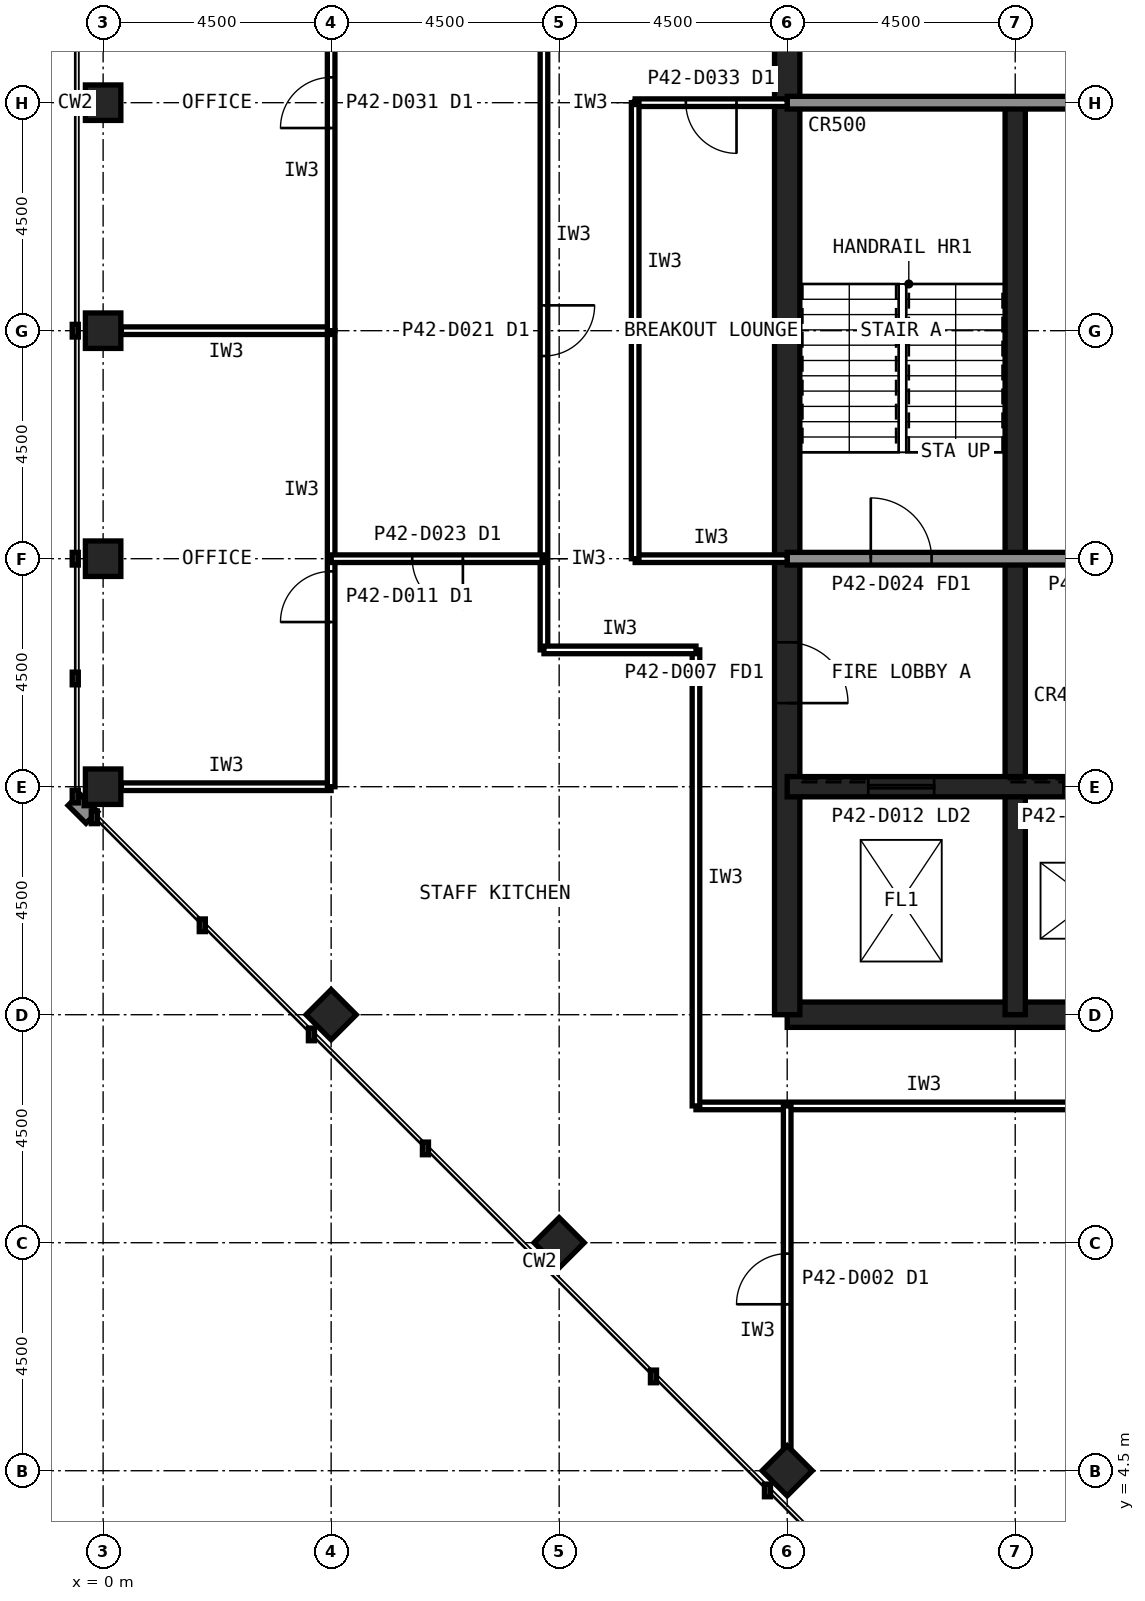
"""IFC4 building model, lengths in metres.
Left out: names, types, materials, properties, quantities, classifications, styles, units other than length and angle.
Written with IfcOpenShell. Run it as: python <this file> out.ifc"""

import sys

from ifc_helpers import new_model, si_unit, direction, frame, frame_2d, origin, origin_2d, place, context, subcontext, project, spatial, rectangle, hollow_rectangle, extrude, element, fill, save


model = new_model("IFC4")
c1 = context("Model", 3, precision=1e-05, world=origin(), true_north=direction((0.0, 1.0)))
c2 = subcontext(c1, "Body", "Model", "MODEL_VIEW")
j1 = project(units=[si_unit("LENGTHUNIT", "METRE"), si_unit("PLANEANGLEUNIT", "RADIAN")], contexts=[c1])
p1 = place(None, origin())
s1 = spatial("IfcSite", under=j1, at=p1, CompositionType="ELEMENT")
p2 = place(p1, origin())
s2 = spatial("IfcBuilding", under=s1, at=p2, CompositionType="ELEMENT")
p3 = place(p2, frame((0.0, 0.0, 175.6)))
s3 = spatial("IfcBuildingStorey", under=s2, at=p3, CompositionType="ELEMENT", Elevation=175.6)
for number, where, z_axis, x_axis in (
    (1, (0.0, 31.5, 0.0), (0.0, 0.0, 1.0), (1.0, 0.0, 0.0)),
    (2, (0.0, 27.0, 0.0), (0.0, 0.0, 1.0), (1.0, 0.0, 0.0)),
    (3, (0.0, 22.5, 0.0), (0.0, 0.0, 1.0), (1.0, 0.0, 0.0)),
    (4, (0.0, 18.0, 0.0), (0.0, 0.0, 1.0), (1.0, 0.0, 0.0)),
    (5, (13.5, 4.5, 0.0), (0.0, 0.0, 1.0), (0.707, 0.707, 0.0)),
    (6, (9.0, 9.0, 0.0), (0.0, 0.0, 1.0), (0.707, 0.707, 0.0)),
    (7, (4.5, 13.5, 0.0), (0.0, 0.0, 1.0), (0.707, 0.707, 0.0)),
):
    element("IfcColumn", number, at=place(p3, frame(where, z_axis=z_axis, x_axis=x_axis)), inside=s3, PredefinedType="COLUMN", context=c2, shape_type="SweptSolid", body=[
        extrude(hollow_rectangle(XDim=0.7, YDim=0.7, WallThickness=0.036, at=origin_2d()), origin(), (0.0, 0.0, 1.0), 4.0),
    ])
p4 = place(p3, frame((13.5, 13.5, 0.0), z_axis=(0.0, 0.0, 1.0), x_axis=(1.0, 0.0, 0.0)))
e8 = element("IfcWall", 8, at=p4, inside=s3, PredefinedType="SHEAR", context=c2, shape_type="SweptSolid", body=[
    extrude(rectangle(XDim=27.0, YDim=0.5, at=frame_2d((13.5, 0.0))), origin(), (0.0, 0.0, 1.0), 4.0),
])
p5 = place(p3, frame((13.5, 40.5, 0.0), z_axis=(0.0, 0.0, 1.0), x_axis=(0.0, -1.0, 0.0)))
e9 = element("IfcWall", 9, at=p5, inside=s3, PredefinedType="SHEAR", context=c2, shape_type="SweptSolid", body=[
    extrude(rectangle(XDim=27.0, YDim=0.5, at=frame_2d((13.5, 0.0))), origin(), (0.0, 0.0, 1.0), 4.0),
])
p6 = place(p5, frame((19.65, 0.0, 0.0)))
e10 = element("IfcOpeningElement", 10, at=p6, cuts=e9, PredefinedType="OPENING", context=c2, shape_type="SweptSolid", body=[
    extrude(rectangle(XDim=1.2, YDim=2.1, at=frame_2d((0.6, 1.05))), frame((0.0, 0.26, 0.0), z_axis=(0.0, -1.0, 0.0), x_axis=(1.0, 0.0, 0.0)), (0.0, 0.0, 1.0), 0.52),
])
p7 = place(p5, frame((5.85, 0.0, 0.0)))
e11 = element("IfcOpeningElement", 11, at=p7, cuts=e9, PredefinedType="OPENING", context=c2, shape_type="SweptSolid", body=[
    extrude(rectangle(XDim=1.8, YDim=2.1, at=frame_2d((0.9, 1.05))), frame((0.0, 0.26, 0.0), z_axis=(0.0, -1.0, 0.0), x_axis=(1.0, 0.0, 0.0)), (0.0, 0.0, 1.0), 0.52),
])
p8 = place(p3, frame((18.0, 13.5, 0.0), z_axis=(0.0, 0.0, 1.0), x_axis=(0.0, 1.0, 0.0)))
e12 = element("IfcWall", 12, at=p8, inside=s3, PredefinedType="SHEAR", context=c2, shape_type="SweptSolid", body=[
    extrude(rectangle(XDim=18.0, YDim=0.4, at=frame_2d((9.0, 0.0))), origin(), (0.0, 0.0, 1.0), 4.0),
])
p9 = place(p3, frame((13.5, 18.0, 0.0), z_axis=(0.0, 0.0, 1.0), x_axis=(1.0, 0.0, 0.0)))
e13 = element("IfcWall", 13, at=p9, inside=s3, PredefinedType="SHEAR", context=c2, shape_type="SweptSolid", body=[
    extrude(rectangle(XDim=27.0, YDim=0.4, at=frame_2d((13.5, 0.0))), origin(), (0.0, 0.0, 1.0), 4.0),
])
p10 = place(p9, frame((24.3, 0.0, 0.0)))
e14 = element("IfcOpeningElement", 14, at=p10, cuts=e13, PredefinedType="OPENING", context=c2, shape_type="SweptSolid", body=[
    extrude(rectangle(XDim=0.9, YDim=2.1, at=frame_2d((0.45, 1.05))), frame((0.0, 0.21, 0.0), z_axis=(0.0, -1.0, 0.0), x_axis=(1.0, 0.0, 0.0)), (0.0, 0.0, 1.0), 0.42),
])
p11 = place(p9, frame((5.45, 0.0, 0.0)))
e15 = element("IfcOpeningElement", 15, at=p11, cuts=e13, PredefinedType="OPENING", context=c2, shape_type="SweptSolid", body=[
    extrude(rectangle(XDim=1.1, YDim=2.1, at=frame_2d((0.55, 1.05))), frame((0.0, 0.21, 0.0), z_axis=(0.0, -1.0, 0.0), x_axis=(1.0, 0.0, 0.0)), (0.0, 0.0, 1.0), 0.42),
])
p12 = place(p9, frame((8.45, 0.0, 0.0)))
e16 = element("IfcOpeningElement", 16, at=p12, cuts=e13, PredefinedType="OPENING", context=c2, shape_type="SweptSolid", body=[
    extrude(rectangle(XDim=1.1, YDim=2.1, at=frame_2d((0.55, 1.05))), frame((0.0, 0.21, 0.0), z_axis=(0.0, -1.0, 0.0), x_axis=(1.0, 0.0, 0.0)), (0.0, 0.0, 1.0), 0.42),
])
p13 = place(p9, frame((11.45, 0.0, 0.0)))
e17 = element("IfcOpeningElement", 17, at=p13, cuts=e13, PredefinedType="OPENING", context=c2, shape_type="SweptSolid", body=[
    extrude(rectangle(XDim=1.1, YDim=2.1, at=frame_2d((0.55, 1.05))), frame((0.0, 0.21, 0.0), z_axis=(0.0, -1.0, 0.0), x_axis=(1.0, 0.0, 0.0)), (0.0, 0.0, 1.0), 0.42),
])
p14 = place(p9, frame((14.45, 0.0, 0.0)))
e18 = element("IfcOpeningElement", 18, at=p14, cuts=e13, PredefinedType="OPENING", context=c2, shape_type="SweptSolid", body=[
    extrude(rectangle(XDim=1.1, YDim=2.1, at=frame_2d((0.55, 1.05))), frame((0.0, 0.21, 0.0), z_axis=(0.0, -1.0, 0.0), x_axis=(1.0, 0.0, 0.0)), (0.0, 0.0, 1.0), 0.42),
])
p15 = place(p9, frame((17.45, 0.0, 0.0)))
e19 = element("IfcOpeningElement", 19, at=p15, cuts=e13, PredefinedType="OPENING", context=c2, shape_type="SweptSolid", body=[
    extrude(rectangle(XDim=1.1, YDim=2.1, at=frame_2d((0.55, 1.05))), frame((0.0, 0.21, 0.0), z_axis=(0.0, -1.0, 0.0), x_axis=(1.0, 0.0, 0.0)), (0.0, 0.0, 1.0), 0.42),
])
p16 = place(p9, frame((20.45, 0.0, 0.0)))
e20 = element("IfcOpeningElement", 20, at=p16, cuts=e13, PredefinedType="OPENING", context=c2, shape_type="SweptSolid", body=[
    extrude(rectangle(XDim=1.1, YDim=2.1, at=frame_2d((0.55, 1.05))), frame((0.0, 0.21, 0.0), z_axis=(0.0, -1.0, 0.0), x_axis=(1.0, 0.0, 0.0)), (0.0, 0.0, 1.0), 0.42),
])
p17 = place(p9, frame((1.6, 0.0, 0.0)))
e21 = element("IfcOpeningElement", 21, at=p17, cuts=e13, PredefinedType="OPENING", context=c2, shape_type="SweptSolid", body=[
    extrude(rectangle(XDim=1.3, YDim=2.2, at=frame_2d((0.65, 1.1))), frame((0.0, 0.21, 0.0), z_axis=(0.0, -1.0, 0.0), x_axis=(1.0, 0.0, 0.0)), (0.0, 0.0, 1.0), 0.42),
])
p18 = place(p3, frame((13.5, 22.5, 0.0), z_axis=(0.0, 0.0, 1.0), x_axis=(1.0, 0.0, 0.0)))
e22 = element("IfcWall", 22, at=p18, inside=s3, PredefinedType="SOLIDWALL", context=c2, shape_type="SweptSolid", body=[
    extrude(rectangle(XDim=27.0, YDim=0.25, at=frame_2d((13.5, 0.0))), origin(), (0.0, 0.0, 1.0), 3.84),
])
p19 = place(p18, frame((1.65, 0.0, 0.0)))
e23 = element("IfcOpeningElement", 23, at=p19, cuts=e22, PredefinedType="OPENING", context=c2, shape_type="SweptSolid", body=[
    extrude(rectangle(XDim=1.2, YDim=2.1, at=frame_2d((0.6, 1.05))), frame((0.0, 0.135, 0.0), z_axis=(0.0, -1.0, 0.0), x_axis=(1.0, 0.0, 0.0)), (0.0, 0.0, 1.0), 0.27),
])
p20 = place(p18, frame((6.025, 0.0, 0.0)))
e24 = element("IfcOpeningElement", 24, at=p20, cuts=e22, PredefinedType="OPENING", context=c2, shape_type="SweptSolid", body=[
    extrude(rectangle(XDim=1.0, YDim=2.1, at=frame_2d((0.5, 1.05))), frame((0.0, 0.135, 0.0), z_axis=(0.0, -1.0, 0.0), x_axis=(1.0, 0.0, 0.0)), (0.0, 0.0, 1.0), 0.27),
])
p21 = place(p18, frame((10.525, 0.0, 0.0)))
e25 = element("IfcOpeningElement", 25, at=p21, cuts=e22, PredefinedType="OPENING", context=c2, shape_type="SweptSolid", body=[
    extrude(rectangle(XDim=1.0, YDim=2.1, at=frame_2d((0.5, 1.05))), frame((0.0, 0.135, 0.0), z_axis=(0.0, -1.0, 0.0), x_axis=(1.0, 0.0, 0.0)), (0.0, 0.0, 1.0), 0.27),
])
p22 = place(p18, frame((19.75, 0.0, 0.0)))
e26 = element("IfcOpeningElement", 26, at=p22, cuts=e22, PredefinedType="OPENING", context=c2, shape_type="SweptSolid", body=[
    extrude(rectangle(XDim=1.0, YDim=2.1, at=frame_2d((0.5, 1.05))), frame((0.0, 0.135, 0.0), z_axis=(0.0, -1.0, 0.0), x_axis=(1.0, 0.0, 0.0)), (0.0, 0.0, 1.0), 0.27),
])
p23 = place(p18, frame((15.05, 0.0, 0.0)))
e27 = element("IfcOpeningElement", 27, at=p23, cuts=e22, PredefinedType="OPENING", context=c2, shape_type="SweptSolid", body=[
    extrude(rectangle(XDim=1.4, YDim=2.4, at=frame_2d((0.7, 1.2))), frame((0.0, 0.135, 0.0), z_axis=(0.0, -1.0, 0.0), x_axis=(1.0, 0.0, 0.0)), (0.0, 0.0, 1.0), 0.27),
])
p24 = place(p3, frame((13.5, 31.5, 0.0), z_axis=(0.0, 0.0, 1.0), x_axis=(1.0, 0.0, 0.0)))
e28 = element("IfcWall", 28, at=p24, inside=s3, PredefinedType="SOLIDWALL", context=c2, shape_type="SweptSolid", body=[
    extrude(rectangle(XDim=27.0, YDim=0.25, at=frame_2d((13.5, 0.0))), origin(), (0.0, 0.0, 1.0), 3.84),
])
p25 = place(p24, frame((24.15, 0.0, 0.0)))
e29 = element("IfcOpeningElement", 29, at=p25, cuts=e28, PredefinedType="OPENING", context=c2, shape_type="SweptSolid", body=[
    extrude(rectangle(XDim=1.2, YDim=2.1, at=frame_2d((0.6, 1.05))), frame((0.0, 0.135, 0.0), z_axis=(0.0, -1.0, 0.0), x_axis=(1.0, 0.0, 0.0)), (0.0, 0.0, 1.0), 0.27),
])
p26 = place(p24, frame((15.3, 0.0, 0.0)))
e30 = element("IfcOpeningElement", 30, at=p26, cuts=e28, PredefinedType="OPENING", context=c2, shape_type="SweptSolid", body=[
    extrude(rectangle(XDim=0.9, YDim=2.1, at=frame_2d((0.45, 1.05))), frame((0.0, 0.135, 0.0), z_axis=(0.0, -1.0, 0.0), x_axis=(1.0, 0.0, 0.0)), (0.0, 0.0, 1.0), 0.27),
])
p27 = place(p24, frame((19.8, 0.0, 0.0)))
e31 = element("IfcOpeningElement", 31, at=p27, cuts=e28, PredefinedType="OPENING", context=c2, shape_type="SweptSolid", body=[
    extrude(rectangle(XDim=0.9, YDim=2.1, at=frame_2d((0.45, 1.05))), frame((0.0, 0.135, 0.0), z_axis=(0.0, -1.0, 0.0), x_axis=(1.0, 0.0, 0.0)), (0.0, 0.0, 1.0), 0.27),
])
p28 = place(p3, frame((8.7, 33.3, 0.0), z_axis=(0.0, 0.0, 1.0), x_axis=(0.0, -1.0, 0.0)))
e32 = element("IfcWall", 32, at=p28, inside=s3, PredefinedType="PARTITIONING", context=c2, shape_type="SweptSolid", body=[
    extrude(rectangle(XDim=12.6, YDim=0.15, at=frame_2d((6.3, 0.0))), origin(), (0.0, 0.0, 1.0), 3.84),
])
p29 = place(p28, frame((5.8, 0.0, 0.0)))
e33 = element("IfcOpeningElement", 33, at=p29, cuts=e32, PredefinedType="OPENING", context=c2, shape_type="SweptSolid", body=[
    extrude(rectangle(XDim=1.0, YDim=2.1, at=frame_2d((0.5, 1.05))), frame((0.0, 0.085, 0.0), z_axis=(0.0, -1.0, 0.0), x_axis=(1.0, 0.0, 0.0)), (0.0, 0.0, 1.0), 0.17),
])
for number, where, z_axis, x_axis in (
    (34, (11.7, 11.7, 0.0), (0.0, 0.0, 1.0), (1.0, 0.0, 0.0)),
    (35, (11.7, 20.7, 0.0), (0.0, 0.0, 1.0), (0.0, -1.0, 0.0)),
):
    element("IfcWall", number, at=place(p3, frame(where, z_axis=z_axis, x_axis=x_axis)), inside=s3, PredefinedType="PARTITIONING", context=c2, shape_type="SweptSolid", body=[
        extrude(rectangle(XDim=9.0, YDim=0.15, at=frame_2d((4.5, 0.0))), origin(), (0.0, 0.0, 1.0), 3.84),
    ])
p30 = place(p3, frame((8.7, 20.7, 0.0), z_axis=(0.0, 0.0, 1.0), x_axis=(1.0, 0.0, 0.0)))
e36 = element("IfcWall", 36, at=p30, inside=s3, PredefinedType="PARTITIONING", context=c2, shape_type="SweptSolid", body=[
    extrude(rectangle(XDim=3.0, YDim=0.15, at=frame_2d((1.5, 0.0))), origin(), (0.0, 0.0, 1.0), 3.84),
])
p31 = place(p3, frame((0.36, 18.0, 0.0), z_axis=(0.0, 0.0, 1.0), x_axis=(1.0, 0.0, 0.0)))
e37 = element("IfcWall", 37, at=p31, inside=s3, PredefinedType="PARTITIONING", context=c2, shape_type="SweptSolid", body=[
    extrude(rectangle(XDim=4.14, YDim=0.15, at=frame_2d((2.07, 0.0))), origin(), (0.0, 0.0, 1.0), 2.989),
])
p32 = place(p3, frame((4.5, 18.0, 0.0), z_axis=(0.0, 0.0, 1.0), x_axis=(0.0, 1.0, 0.0)))
e38 = element("IfcWall", 38, at=p32, inside=s3, PredefinedType="PARTITIONING", context=c2, shape_type="SweptSolid", body=[
    extrude(rectangle(XDim=9.0, YDim=0.15, at=frame_2d((4.5, 0.0))), origin(), (0.0, 0.0, 1.0), 3.84),
])
p33 = place(p32, frame((3.25, 0.0, 0.0)))
e39 = element("IfcOpeningElement", 39, at=p33, cuts=e38, PredefinedType="OPENING", context=c2, shape_type="SweptSolid", body=[
    extrude(rectangle(XDim=1.0, YDim=2.1, at=frame_2d((0.5, 1.05))), frame((0.0, 0.085, 0.0), z_axis=(0.0, -1.0, 0.0), x_axis=(1.0, 0.0, 0.0)), (0.0, 0.0, 1.0), 0.17),
])
p34 = place(p3, frame((4.5, 27.0, 0.0), z_axis=(0.0, 0.0, 1.0), x_axis=(-1.0, 0.0, 0.0)))
e40 = element("IfcWall", 40, at=p34, inside=s3, PredefinedType="PARTITIONING", context=c2, shape_type="SweptSolid", body=[
    extrude(rectangle(XDim=4.14, YDim=0.15, at=frame_2d((2.07, 0.0))), origin(), (0.0, 0.0, 1.0), 2.989),
])
p35 = place(p3, frame((4.5, 27.0, 0.0), z_axis=(0.0, 0.0, 1.0), x_axis=(0.0, 1.0, 0.0)))
e41 = element("IfcWall", 41, at=p35, inside=s3, PredefinedType="PARTITIONING", context=c2, shape_type="SweptSolid", body=[
    extrude(rectangle(XDim=9.0, YDim=0.15, at=frame_2d((4.5, 0.0))), origin(), (0.0, 0.0, 1.0), 3.84),
])
p36 = place(p35, frame((4.0, 0.0, 0.0)))
e42 = element("IfcOpeningElement", 42, at=p36, cuts=e41, PredefinedType="OPENING", context=c2, shape_type="SweptSolid", body=[
    extrude(rectangle(XDim=1.0, YDim=2.1, at=frame_2d((0.5, 1.05))), frame((0.0, 0.085, 0.0), z_axis=(0.0, -1.0, 0.0), x_axis=(1.0, 0.0, 0.0)), (0.0, 0.0, 1.0), 0.17),
])
p37 = place(p3, frame((10.5, 22.5, 0.0), z_axis=(0.0, 0.0, 1.0), x_axis=(1.0, 0.0, 0.0)))
e43 = element("IfcWall", 43, at=p37, inside=s3, PredefinedType="PARTITIONING", context=c2, shape_type="SweptSolid", body=[
    extrude(rectangle(XDim=3.0, YDim=0.15, at=frame_2d((1.5, 0.0))), origin(), (0.0, 0.0, 1.0), 2.989),
])
p38 = place(p3, frame((13.5, 31.5, 0.0), z_axis=(0.0, 0.0, 1.0), x_axis=(-1.0, 0.0, 0.0)))
e44 = element("IfcWall", 44, at=p38, inside=s3, PredefinedType="PARTITIONING", context=c2, shape_type="SweptSolid", body=[
    extrude(rectangle(XDim=3.0, YDim=0.15, at=frame_2d((1.5, 0.0))), origin(), (0.0, 0.0, 1.0), 2.989),
])
p39 = place(p38, frame((1.0, 0.0, 0.0)))
e45 = element("IfcOpeningElement", 45, at=p39, cuts=e44, PredefinedType="OPENING", context=c2, shape_type="SweptSolid", body=[
    extrude(rectangle(XDim=1.0, YDim=2.1, at=frame_2d((0.5, 1.05))), frame((0.0, 0.085, 0.0), z_axis=(0.0, -1.0, 0.0), x_axis=(1.0, 0.0, 0.0)), (0.0, 0.0, 1.0), 0.17),
])
p40 = place(p3, frame((10.5, 31.5, 0.0), z_axis=(0.0, 0.0, 1.0), x_axis=(0.0, -1.0, 0.0)))
e46 = element("IfcWall", 46, at=p40, inside=s3, PredefinedType="PARTITIONING", context=c2, shape_type="SweptSolid", body=[
    extrude(rectangle(XDim=9.0, YDim=0.15, at=frame_2d((4.5, 0.0))), origin(), (0.0, 0.0, 1.0), 3.84),
])
p41 = place(p3, frame((13.5, 4.87, 0.0), z_axis=(0.0, 0.0, 1.0), x_axis=(0.0, 1.0, 0.0)))
e47 = element("IfcWall", 47, at=p41, inside=s3, PredefinedType="PARTITIONING", context=c2, shape_type="SweptSolid", body=[
    extrude(rectangle(XDim=6.83, YDim=0.15, at=frame_2d((3.415, 0.0))), origin(), (0.0, 0.0, 1.0), 2.989),
])
p42 = place(p41, frame((2.915, 0.0, 0.0)))
e48 = element("IfcOpeningElement", 48, at=p42, cuts=e47, PredefinedType="OPENING", context=c2, shape_type="SweptSolid", body=[
    extrude(rectangle(XDim=1.0, YDim=2.1, at=frame_2d((0.5, 1.05))), frame((0.0, 0.085, 0.0), z_axis=(0.0, -1.0, 0.0), x_axis=(1.0, 0.0, 0.0)), (0.0, 0.0, 1.0), 0.17),
])
p43 = place(p3, frame((8.7, 22.5, 0.0), z_axis=(0.0, 0.0, 1.0), x_axis=(-1.0, 0.0, 0.0)))
e49 = element("IfcWall", 49, at=p43, inside=s3, PredefinedType="PARTITIONING", context=c2, shape_type="SweptSolid", body=[
    extrude(rectangle(XDim=4.2, YDim=0.15, at=frame_2d((2.1, 0.0))), origin(), (0.0, 0.0, 1.0), 2.989),
])
p44 = place(p43, frame((1.6, 0.0, 0.0)))
e50 = element("IfcOpeningElement", 50, at=p44, cuts=e49, PredefinedType="OPENING", context=c2, shape_type="SweptSolid", body=[
    extrude(rectangle(XDim=1.0, YDim=2.1, at=frame_2d((0.5, 1.05))), frame((0.0, 0.085, 0.0), z_axis=(0.0, -1.0, 0.0), x_axis=(1.0, 0.0, 0.0)), (0.0, 0.0, 1.0), 0.17),
])
p45 = place(p6, origin())
e51 = element("IfcDoor", 51, at=p45, inside=s3, OperationType="SINGLE_SWING_RIGHT", PredefinedType="DOOR", context=c2, shape_type="SweptSolid", body=[
    extrude(rectangle(XDim=1.2, YDim=2.1, at=frame_2d((0.6, 1.05))), frame((0.0, 0.025, 0.0), z_axis=(0.0, -1.0, 0.0), x_axis=(1.0, 0.0, 0.0)), (0.0, 0.0, 1.0), 0.05),
])
fill(e10, e51)
p46 = place(p19, origin())
e52 = element("IfcDoor", 52, at=p46, inside=s3, OperationType="SINGLE_SWING_LEFT", PredefinedType="DOOR", context=c2, shape_type="SweptSolid", body=[
    extrude(rectangle(XDim=1.2, YDim=2.1, at=frame_2d((0.6, 1.05))), frame((0.0, 0.025, 0.0), z_axis=(0.0, -1.0, 0.0), x_axis=(1.0, 0.0, 0.0)), (0.0, 0.0, 1.0), 0.05),
])
fill(e23, e52)
p47 = place(p11, origin())
e53 = element("IfcDoor", 53, at=p47, inside=s3, OperationType="SLIDING_TO_LEFT", PredefinedType="DOOR", context=c2, shape_type="SweptSolid", body=[
    extrude(rectangle(XDim=1.1, YDim=2.1, at=frame_2d((0.55, 1.05))), frame((0.0, 0.025, 0.0), z_axis=(0.0, -1.0, 0.0), x_axis=(1.0, 0.0, 0.0)), (0.0, 0.0, 1.0), 0.05),
])
fill(e15, e53)
p48 = place(p17, origin())
e54 = element("IfcDoor", 54, at=p48, inside=s3, OperationType="SLIDING_TO_LEFT", PredefinedType="DOOR", context=c2, shape_type="SweptSolid", body=[
    extrude(rectangle(XDim=1.3, YDim=2.2, at=frame_2d((0.65, 1.1))), frame((0.0, 0.025, 0.0), z_axis=(0.0, -1.0, 0.0), x_axis=(1.0, 0.0, 0.0)), (0.0, 0.0, 1.0), 0.05),
])
fill(e21, e54)
p49 = place(p29, origin())
e55 = element("IfcDoor", 55, at=p49, inside=s3, OperationType="SINGLE_SWING_LEFT", PredefinedType="DOOR", context=c2, shape_type="SweptSolid", body=[
    extrude(rectangle(XDim=1.0, YDim=2.1, at=frame_2d((0.5, 1.05))), frame((0.0, 0.025, 0.0), z_axis=(0.0, -1.0, 0.0), x_axis=(1.0, 0.0, 0.0)), (0.0, 0.0, 1.0), 0.05),
])
fill(e33, e55)
p50 = place(p33, origin())
e56 = element("IfcDoor", 56, at=p50, inside=s3, OperationType="SINGLE_SWING_LEFT", PredefinedType="DOOR", context=c2, shape_type="SweptSolid", body=[
    extrude(rectangle(XDim=1.0, YDim=2.1, at=frame_2d((0.5, 1.05))), frame((0.0, 0.025, 0.0), z_axis=(0.0, -1.0, 0.0), x_axis=(1.0, 0.0, 0.0)), (0.0, 0.0, 1.0), 0.05),
])
fill(e39, e56)
p51 = place(p36, origin())
e57 = element("IfcDoor", 57, at=p51, inside=s3, OperationType="SINGLE_SWING_LEFT", PredefinedType="DOOR", context=c2, shape_type="SweptSolid", body=[
    extrude(rectangle(XDim=1.0, YDim=2.1, at=frame_2d((0.5, 1.05))), frame((0.0, 0.025, 0.0), z_axis=(0.0, -1.0, 0.0), x_axis=(1.0, 0.0, 0.0)), (0.0, 0.0, 1.0), 0.05),
])
fill(e42, e57)
p52 = place(p39, origin())
e58 = element("IfcDoor", 58, at=p52, inside=s3, OperationType="SINGLE_SWING_LEFT", PredefinedType="DOOR", context=c2, shape_type="SweptSolid", body=[
    extrude(rectangle(XDim=1.0, YDim=2.1, at=frame_2d((0.5, 1.05))), frame((0.0, 0.025, 0.0), z_axis=(0.0, -1.0, 0.0), x_axis=(1.0, 0.0, 0.0)), (0.0, 0.0, 1.0), 0.05),
])
fill(e45, e58)
p53 = place(p42, origin())
e59 = element("IfcDoor", 59, at=p53, inside=s3, OperationType="SINGLE_SWING_LEFT", PredefinedType="DOOR", context=c2, shape_type="SweptSolid", body=[
    extrude(rectangle(XDim=1.0, YDim=2.1, at=frame_2d((0.5, 1.05))), frame((0.0, 0.025, 0.0), z_axis=(0.0, -1.0, 0.0), x_axis=(1.0, 0.0, 0.0)), (0.0, 0.0, 1.0), 0.05),
])
fill(e48, e59)
p54 = place(p44, origin())
e60 = element("IfcDoor", 60, at=p54, inside=s3, OperationType="SINGLE_SWING_LEFT", PredefinedType="DOOR", context=c2, shape_type="SweptSolid", body=[
    extrude(rectangle(XDim=1.0, YDim=2.1, at=frame_2d((0.5, 1.05))), frame((0.0, 0.025, 0.0), z_axis=(0.0, -1.0, 0.0), x_axis=(1.0, 0.0, 0.0)), (0.0, 0.0, 1.0), 0.05),
])
fill(e50, e60)
save(model, sys.argv[1])
